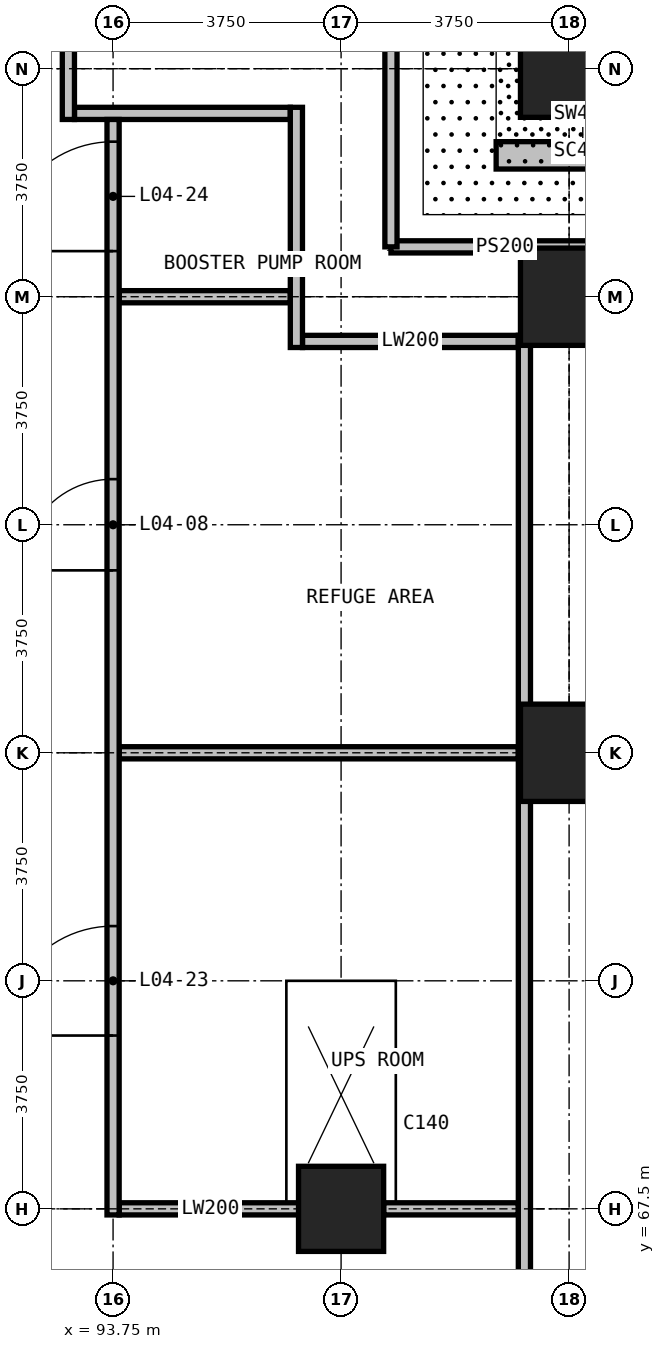
"""IFC4 building model, lengths in metres.
Left out: names, types, materials, properties, quantities, classifications, styles, units other than length and angle.
Written with IfcOpenShell. Run it as: python <this file> out.ifc"""

import sys

from ifc_helpers import new_model, si_unit, direction, frame, frame_2d, origin, origin_2d, place, context, subcontext, project, spatial, rectangle, extrude, element, fill, save


model = new_model("IFC4")
c1 = context("Model", 3, precision=1e-05, world=origin(), true_north=direction((0.0, 1.0)))
c2 = subcontext(c1, "Body", "Model", "MODEL_VIEW")
j1 = project(units=[si_unit("LENGTHUNIT", "METRE"), si_unit("PLANEANGLEUNIT", "RADIAN")], contexts=[c1])
p1 = place(None, origin())
s1 = spatial("IfcSite", under=j1, at=p1, CompositionType="ELEMENT")
p2 = place(p1, origin())
s2 = spatial("IfcBuilding", under=s1, at=p2, CompositionType="ELEMENT")
p3 = place(p2, frame((0.0, 0.0, 30.0)))
s3 = spatial("IfcBuildingStorey", under=s2, at=p3, CompositionType="ELEMENT", Elevation=30.0)
for number, where, z_axis, x_axis in (
    (1, (101.25, 75.0, 0.0), (0.0, 0.0, 1.0), (1.0, 0.0, 0.0)),
    (2, (101.25, 82.5, 0.0), (0.0, 0.0, 1.0), (1.0, 0.0, 0.0)),
):
    element("IfcColumn", number, at=place(p3, frame(where, z_axis=z_axis, x_axis=x_axis)), inside=s3, PredefinedType="COLUMN", context=c2, shape_type="SweptSolid", body=[
        extrude(rectangle(XDim=1.6, YDim=1.6, at=origin_2d()), origin(), (0.0, 0.0, 1.0), 5.0),
    ])
p4 = place(p3, frame((97.5, 67.5, 0.0), z_axis=(0.0, 0.0, 1.0), x_axis=(1.0, 0.0, 0.0)))
e3 = element("IfcColumn", 3, at=p4, inside=s3, PredefinedType="COLUMN", context=c2, shape_type="SweptSolid", body=[
    extrude(rectangle(XDim=1.4, YDim=1.4, at=origin_2d()), origin(), (0.0, 0.0, 1.0), 5.0),
])
p5 = place(p3, frame((101.25, 86.25, 0.0), z_axis=(0.0, 0.0, 1.0), x_axis=(1.0, 0.0, 0.0)))
e4 = element("IfcColumn", 4, at=p5, inside=s3, PredefinedType="COLUMN", context=c2, shape_type="SweptSolid", body=[
    extrude(rectangle(XDim=1.6, YDim=1.6, at=origin_2d()), origin(), (0.0, 0.0, 1.0), 5.0),
])
for number, where, z_axis, x_axis in (
    (5, (98.32, 83.32, 0.0), (0.0, 0.0, 1.0), (1.0, 0.0, 0.0)),
    (6, (98.32, 83.32, 0.0), (0.0, 0.0, 1.0), (0.0, 1.0, 0.0)),
):
    element("IfcWall", number, at=place(p3, frame(where, z_axis=z_axis, x_axis=x_axis)), inside=s3, PredefinedType="SOLIDWALL", context=c2, shape_type="SweptSolid", body=[
        extrude(rectangle(XDim=3.75, YDim=0.2, at=frame_2d((1.875, 0.0))), origin(), (0.0, 0.0, 1.0), 4.7),
    ])
p6 = place(p3, frame((100.05, 84.825, 0.0), z_axis=(0.0, 0.0, 1.0), x_axis=(1.0, 0.0, 0.0)))
e7 = element("IfcWall", 7, at=p6, inside=s3, PredefinedType="USERDEFINED", context=c2, shape_type="SweptSolid", body=[
    extrude(rectangle(XDim=2.85, YDim=0.45, at=frame_2d((1.425, 0.0))), origin(), (0.0, 0.0, 1.0), 5.2),
])
p7 = place(p3, frame((93.85, 67.5, 0.0), z_axis=(0.0, 0.0, 1.0), x_axis=(1.0, 0.0, 0.0)))
e8 = element("IfcWall", 8, at=p7, inside=s3, PredefinedType="PARTITIONING", context=c2, shape_type="SweptSolid", body=[
    extrude(rectangle(XDim=3.0, YDim=0.2, at=frame_2d((1.5, 0.0))), origin(), (0.0, 0.0, 1.0), 3.1),
])
p8 = place(p3, frame((96.85, 67.5, 0.0), z_axis=(0.0, 0.0, 1.0), x_axis=(1.0, 0.0, 0.0)))
e9 = element("IfcWall", 9, at=p8, inside=s3, PredefinedType="PARTITIONING", context=c2, shape_type="SweptSolid", body=[
    extrude(rectangle(XDim=1.35, YDim=0.2, at=frame_2d((0.675, 0.0))), origin(), (0.0, 0.0, 1.0), 4.7),
])
p9 = place(p3, frame((98.2, 67.5, 0.0), z_axis=(0.0, 0.0, 1.0), x_axis=(1.0, 0.0, 0.0)))
e10 = element("IfcWall", 10, at=p9, inside=s3, PredefinedType="PARTITIONING", context=c2, shape_type="SweptSolid", body=[
    extrude(rectangle(XDim=2.215, YDim=0.2, at=frame_2d((1.107, 0.0))), origin(), (0.0, 0.0, 1.0), 3.3),
])
p10 = place(p3, frame((93.85, 75.0, 0.0), z_axis=(0.0, 0.0, 1.0), x_axis=(1.0, 0.0, 0.0)))
e11 = element("IfcWall", 11, at=p10, inside=s3, PredefinedType="PARTITIONING", context=c2, shape_type="SweptSolid", body=[
    extrude(rectangle(XDim=6.565, YDim=0.2, at=frame_2d((3.282, 0.0))), origin(), (0.0, 0.0, 1.0), 2.1),
])
p11 = place(p3, frame((96.865, 81.765, 0.0), z_axis=(0.0, 0.0, 1.0), x_axis=(1.0, 0.0, 0.0)))
e12 = element("IfcWall", 12, at=p11, inside=s3, PredefinedType="PARTITIONING", context=c2, shape_type="SweptSolid", body=[
    extrude(rectangle(XDim=3.55, YDim=0.2, at=frame_2d((1.775, 0.0))), origin(), (0.0, 0.0, 1.0), 4.7),
])
p12 = place(p3, frame((93.85, 82.5, 0.0), z_axis=(0.0, 0.0, 1.0), x_axis=(1.0, 0.0, 0.0)))
e13 = element("IfcWall", 13, at=p12, inside=s3, PredefinedType="PARTITIONING", context=c2, shape_type="SweptSolid", body=[
    extrude(rectangle(XDim=2.815, YDim=0.2, at=frame_2d((1.407, 0.0))), origin(), (0.0, 0.0, 1.0), 2.1),
])
p13 = place(p3, frame((93.115, 85.515, 0.0), z_axis=(0.0, 0.0, 1.0), x_axis=(1.0, 0.0, 0.0)))
e14 = element("IfcWall", 14, at=p13, inside=s3, PredefinedType="PARTITIONING", context=c2, shape_type="SweptSolid", body=[
    extrude(rectangle(XDim=3.55, YDim=0.2, at=frame_2d((1.775, 0.0))), origin(), (0.0, 0.0, 1.0), 4.7),
])
p14 = place(p3, frame((93.015, 85.415, 0.0), z_axis=(0.0, 0.0, 1.0), x_axis=(0.0, 1.0, 0.0)))
e15 = element("IfcWall", 15, at=p14, inside=s3, PredefinedType="PARTITIONING", context=c2, shape_type="SweptSolid", body=[
    extrude(rectangle(XDim=3.95, YDim=0.2, at=frame_2d((1.975, 0.0))), origin(), (0.0, 0.0, 1.0), 4.7),
])
p15 = place(p3, frame((93.75, 67.4, 0.0), z_axis=(0.0, 0.0, 1.0), x_axis=(0.0, 1.0, 0.0)))
e16 = element("IfcWall", 16, at=p15, inside=s3, PredefinedType="PARTITIONING", context=c2, shape_type="SweptSolid", body=[
    extrude(rectangle(XDim=18.015, YDim=0.2, at=frame_2d((9.008, 0.0))), origin(), (0.0, 0.0, 1.0), 4.7),
])
p16 = place(p15, frame((10.6, 0.0, 0.0)))
e17 = element("IfcOpeningElement", 17, at=p16, cuts=e16, PredefinedType="OPENING", context=c2, shape_type="SweptSolid", body=[
    extrude(rectangle(XDim=1.5, YDim=2.2, at=frame_2d((0.75, 1.1))), frame((0.0, 0.11, 0.0), z_axis=(0.0, -1.0, 0.0), x_axis=(1.0, 0.0, 0.0)), (0.0, 0.0, 1.0), 0.22),
])
p17 = place(p15, frame((2.95, 0.0, 0.0)))
e18 = element("IfcOpeningElement", 18, at=p17, cuts=e16, PredefinedType="OPENING", context=c2, shape_type="SweptSolid", body=[
    extrude(rectangle(XDim=1.8, YDim=2.3, at=frame_2d((0.9, 1.15))), frame((0.0, 0.11, 0.0), z_axis=(0.0, -1.0, 0.0), x_axis=(1.0, 0.0, 0.0)), (0.0, 0.0, 1.0), 0.22),
])
p18 = place(p15, frame((15.85, 0.0, 0.0)))
e19 = element("IfcOpeningElement", 19, at=p18, cuts=e16, PredefinedType="OPENING", context=c2, shape_type="SweptSolid", body=[
    extrude(rectangle(XDim=1.8, YDim=2.3, at=frame_2d((0.9, 1.15))), frame((0.0, 0.11, 0.0), z_axis=(0.0, -1.0, 0.0), x_axis=(1.0, 0.0, 0.0)), (0.0, 0.0, 1.0), 0.22),
])
p19 = place(p3, frame((96.765, 81.665, 0.0), z_axis=(0.0, 0.0, 1.0), x_axis=(0.0, 1.0, 0.0)))
e20 = element("IfcWall", 20, at=p19, inside=s3, PredefinedType="PARTITIONING", context=c2, shape_type="SweptSolid", body=[
    extrude(rectangle(XDim=3.95, YDim=0.2, at=frame_2d((1.975, 0.0))), origin(), (0.0, 0.0, 1.0), 4.7),
])
p20 = place(p3, frame((100.515, 53.135, 0.0), z_axis=(0.0, 0.0, 1.0), x_axis=(0.0, 1.0, 0.0)))
e21 = element("IfcWall", 21, at=p20, inside=s3, PredefinedType="PARTITIONING", context=c2, shape_type="SweptSolid", body=[
    extrude(rectangle(XDim=28.73, YDim=0.2, at=frame_2d((14.365, 0.0))), origin(), (0.0, 0.0, 1.0), 4.7),
])
p21 = place(p16, origin())
e22 = element("IfcDoor", 22, at=p21, inside=s3, OperationType="DOUBLE_DOOR_SINGLE_SWING", PredefinedType="DOOR", context=c2, shape_type="SweptSolid", body=[
    extrude(rectangle(XDim=1.5, YDim=2.2, at=frame_2d((0.75, 1.1))), frame((0.0, 0.025, 0.0), z_axis=(0.0, -1.0, 0.0), x_axis=(1.0, 0.0, 0.0)), (0.0, 0.0, 1.0), 0.05),
])
fill(e17, e22)
p22 = place(p17, origin())
e23 = element("IfcDoor", 23, at=p22, inside=s3, OperationType="DOUBLE_DOOR_SINGLE_SWING", PredefinedType="DOOR", context=c2, shape_type="SweptSolid", body=[
    extrude(rectangle(XDim=1.8, YDim=2.3, at=frame_2d((0.9, 1.15))), frame((0.0, 0.025, 0.0), z_axis=(0.0, -1.0, 0.0), x_axis=(1.0, 0.0, 0.0)), (0.0, 0.0, 1.0), 0.05),
])
fill(e18, e23)
p23 = place(p18, origin())
e24 = element("IfcDoor", 24, at=p23, inside=s3, OperationType="DOUBLE_DOOR_SINGLE_SWING", PredefinedType="DOOR", context=c2, shape_type="SweptSolid", body=[
    extrude(rectangle(XDim=1.8, YDim=2.3, at=frame_2d((0.9, 1.15))), frame((0.0, 0.025, 0.0), z_axis=(0.0, -1.0, 0.0), x_axis=(1.0, 0.0, 0.0)), (0.0, 0.0, 1.0), 0.05),
])
fill(e19, e24)
save(model, sys.argv[1])
